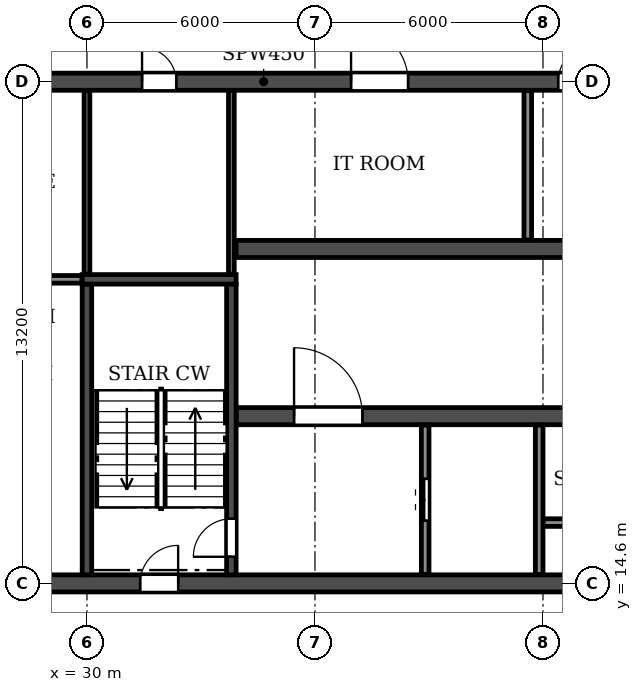
"""IFC4 building model, lengths in metres.
Left out: names, types, materials, properties, quantities, classifications, styles, units other than length and angle.
Written with IfcOpenShell. Run it as: python <this file> out.ifc"""

import sys

from ifc_helpers import new_model, si_unit, direction, frame, frame_2d, origin, place, context, subcontext, project, spatial, rectangle, extrude, element, fill, save


model = new_model("IFC4")
c1 = context("Model", 3, precision=1e-05, world=origin(), true_north=direction((0.0, 1.0)))
c2 = subcontext(c1, "Body", "Model", "MODEL_VIEW")
j1 = project(units=[si_unit("LENGTHUNIT", "METRE"), si_unit("PLANEANGLEUNIT", "RADIAN")], contexts=[c1])
p1 = place(None, origin())
s1 = spatial("IfcSite", under=j1, at=p1, CompositionType="ELEMENT")
p2 = place(p1, origin())
s2 = spatial("IfcBuilding", under=s1, at=p2, CompositionType="ELEMENT")
p3 = place(p2, frame((0.0, 0.0, 10.8)))
s3 = spatial("IfcBuildingStorey", under=s2, at=p3, CompositionType="ELEMENT", Elevation=10.8)
p4 = place(p3, frame((18.0, 14.6, 0.0), z_axis=(0.0, 0.0, 1.0), x_axis=(1.0, 0.0, 0.0)))
e1 = element("IfcWall", 1, at=p4, inside=s3, PredefinedType="SOLIDWALL", context=c2, shape_type="SweptSolid", body=[
    extrude(rectangle(XDim=66.0, YDim=0.45, at=frame_2d((33.0, 0.0))), origin(), (0.0, 0.0, 1.0), 3.92),
])
p5 = place(p4, frame((0.9, 0.0, 0.0)))
e2 = element("IfcOpeningElement", 2, at=p5, cuts=e1, PredefinedType="OPENING", context=c2, shape_type="SweptSolid", body=[
    extrude(rectangle(XDim=1.0, YDim=2.1, at=frame_2d((0.5, 1.05))), frame((0.0, 0.235, 0.0), z_axis=(0.0, -1.0, 0.0), x_axis=(1.0, 0.0, 0.0)), (0.0, 0.0, 1.0), 0.47),
])
p6 = place(p4, frame((8.8, 0.0, 0.0)))
e3 = element("IfcOpeningElement", 3, at=p6, cuts=e1, PredefinedType="OPENING", context=c2, shape_type="SweptSolid", body=[
    extrude(rectangle(XDim=1.0, YDim=2.1, at=frame_2d((0.5, 1.05))), frame((0.0, 0.235, 0.0), z_axis=(0.0, -1.0, 0.0), x_axis=(1.0, 0.0, 0.0)), (0.0, 0.0, 1.0), 0.47),
])
p7 = place(p4, frame((13.4, 0.0, 0.0)))
e4 = element("IfcOpeningElement", 4, at=p7, cuts=e1, PredefinedType="OPENING", context=c2, shape_type="SweptSolid", body=[
    extrude(rectangle(XDim=1.0, YDim=2.1, at=frame_2d((0.5, 1.05))), frame((0.0, 0.235, 0.0), z_axis=(0.0, -1.0, 0.0), x_axis=(1.0, 0.0, 0.0)), (0.0, 0.0, 1.0), 0.47),
])
p8 = place(p4, frame((24.7, 0.0, 0.0)))
e5 = element("IfcOpeningElement", 5, at=p8, cuts=e1, PredefinedType="OPENING", context=c2, shape_type="SweptSolid", body=[
    extrude(rectangle(XDim=1.0, YDim=2.1, at=frame_2d((0.5, 1.05))), frame((0.0, 0.235, 0.0), z_axis=(0.0, -1.0, 0.0), x_axis=(1.0, 0.0, 0.0)), (0.0, 0.0, 1.0), 0.47),
])
p9 = place(p4, frame((28.6, 0.0, 0.0)))
e6 = element("IfcOpeningElement", 6, at=p9, cuts=e1, PredefinedType="OPENING", context=c2, shape_type="SweptSolid", body=[
    extrude(rectangle(XDim=1.0, YDim=2.1, at=frame_2d((0.5, 1.05))), frame((0.0, 0.235, 0.0), z_axis=(0.0, -1.0, 0.0), x_axis=(1.0, 0.0, 0.0)), (0.0, 0.0, 1.0), 0.47),
])
p10 = place(p4, frame((32.5, 0.0, 0.0)))
e7 = element("IfcOpeningElement", 7, at=p10, cuts=e1, PredefinedType="OPENING", context=c2, shape_type="SweptSolid", body=[
    extrude(rectangle(XDim=1.0, YDim=2.1, at=frame_2d((0.5, 1.05))), frame((0.0, 0.235, 0.0), z_axis=(0.0, -1.0, 0.0), x_axis=(1.0, 0.0, 0.0)), (0.0, 0.0, 1.0), 0.47),
])
p11 = place(p4, frame((35.1, 0.0, 0.0)))
e8 = element("IfcOpeningElement", 8, at=p11, cuts=e1, PredefinedType="OPENING", context=c2, shape_type="SweptSolid", body=[
    extrude(rectangle(XDim=1.0, YDim=2.1, at=frame_2d((0.5, 1.05))), frame((0.0, 0.235, 0.0), z_axis=(0.0, -1.0, 0.0), x_axis=(1.0, 0.0, 0.0)), (0.0, 0.0, 1.0), 0.47),
])
p12 = place(p4, frame((39.0, 0.0, 0.0)))
e9 = element("IfcOpeningElement", 9, at=p12, cuts=e1, PredefinedType="OPENING", context=c2, shape_type="SweptSolid", body=[
    extrude(rectangle(XDim=1.0, YDim=2.1, at=frame_2d((0.5, 1.05))), frame((0.0, 0.235, 0.0), z_axis=(0.0, -1.0, 0.0), x_axis=(1.0, 0.0, 0.0)), (0.0, 0.0, 1.0), 0.47),
])
p13 = place(p4, frame((51.6, 0.0, 0.0)))
e10 = element("IfcOpeningElement", 10, at=p13, cuts=e1, PredefinedType="OPENING", context=c2, shape_type="SweptSolid", body=[
    extrude(rectangle(XDim=1.0, YDim=2.1, at=frame_2d((0.5, 1.05))), frame((0.0, 0.235, 0.0), z_axis=(0.0, -1.0, 0.0), x_axis=(1.0, 0.0, 0.0)), (0.0, 0.0, 1.0), 0.47),
])
p14 = place(p4, frame((56.25, 0.0, 0.0)))
e11 = element("IfcOpeningElement", 11, at=p14, cuts=e1, PredefinedType="OPENING", context=c2, shape_type="SweptSolid", body=[
    extrude(rectangle(XDim=0.9, YDim=2.1, at=frame_2d((0.45, 1.05))), frame((0.0, 0.235, 0.0), z_axis=(0.0, -1.0, 0.0), x_axis=(1.0, 0.0, 0.0)), (0.0, 0.0, 1.0), 0.47),
])
p15 = place(p4, frame((64.1, 0.0, 0.0)))
e12 = element("IfcOpeningElement", 12, at=p15, cuts=e1, PredefinedType="OPENING", context=c2, shape_type="SweptSolid", body=[
    extrude(rectangle(XDim=1.0, YDim=2.1, at=frame_2d((0.5, 1.05))), frame((0.0, 0.235, 0.0), z_axis=(0.0, -1.0, 0.0), x_axis=(1.0, 0.0, 0.0)), (0.0, 0.0, 1.0), 0.47),
])
p16 = place(p3, frame((18.0, 27.8, 0.0), z_axis=(0.0, 0.0, 1.0), x_axis=(1.0, 0.0, 0.0)))
e13 = element("IfcWall", 13, at=p16, inside=s3, PredefinedType="SOLIDWALL", context=c2, shape_type="SweptSolid", body=[
    extrude(rectangle(XDim=66.0, YDim=0.45, at=frame_2d((33.0, 0.0))), origin(), (0.0, 0.0, 1.0), 3.92),
])
p17 = place(p16, frame((0.9, 0.0, 0.0)))
e14 = element("IfcOpeningElement", 14, at=p17, cuts=e13, PredefinedType="OPENING", context=c2, shape_type="SweptSolid", body=[
    extrude(rectangle(XDim=1.0, YDim=2.1, at=frame_2d((0.5, 1.05))), frame((0.0, 0.235, 0.0), z_axis=(0.0, -1.0, 0.0), x_axis=(1.0, 0.0, 0.0)), (0.0, 0.0, 1.0), 0.47),
])
p18 = place(p16, frame((4.25, 0.0, 0.0)))
e15 = element("IfcOpeningElement", 15, at=p18, cuts=e13, PredefinedType="OPENING", context=c2, shape_type="SweptSolid", body=[
    extrude(rectangle(XDim=0.9, YDim=2.1, at=frame_2d((0.45, 1.05))), frame((0.0, 0.235, 0.0), z_axis=(0.0, -1.0, 0.0), x_axis=(1.0, 0.0, 0.0)), (0.0, 0.0, 1.0), 0.47),
])
p19 = place(p16, frame((8.85, 0.0, 0.0)))
e16 = element("IfcOpeningElement", 16, at=p19, cuts=e13, PredefinedType="OPENING", context=c2, shape_type="SweptSolid", body=[
    extrude(rectangle(XDim=0.9, YDim=2.1, at=frame_2d((0.45, 1.05))), frame((0.0, 0.235, 0.0), z_axis=(0.0, -1.0, 0.0), x_axis=(1.0, 0.0, 0.0)), (0.0, 0.0, 1.0), 0.47),
])
p20 = place(p16, frame((13.45, 0.0, 0.0)))
e17 = element("IfcOpeningElement", 17, at=p20, cuts=e13, PredefinedType="OPENING", context=c2, shape_type="SweptSolid", body=[
    extrude(rectangle(XDim=0.9, YDim=2.1, at=frame_2d((0.45, 1.05))), frame((0.0, 0.235, 0.0), z_axis=(0.0, -1.0, 0.0), x_axis=(1.0, 0.0, 0.0)), (0.0, 0.0, 1.0), 0.47),
])
p21 = place(p16, frame((18.95, 0.0, 0.0)))
e18 = element("IfcOpeningElement", 18, at=p21, cuts=e13, PredefinedType="OPENING", context=c2, shape_type="SweptSolid", body=[
    extrude(rectangle(XDim=1.5, YDim=2.1, at=frame_2d((0.75, 1.05))), frame((0.0, 0.235, 0.0), z_axis=(0.0, -1.0, 0.0), x_axis=(1.0, 0.0, 0.0)), (0.0, 0.0, 1.0), 0.47),
])
p22 = place(p16, frame((24.4, 0.0, 0.0)))
e19 = element("IfcOpeningElement", 19, at=p22, cuts=e13, PredefinedType="OPENING", context=c2, shape_type="SweptSolid", body=[
    extrude(rectangle(XDim=1.0, YDim=2.1, at=frame_2d((0.5, 1.05))), frame((0.0, 0.235, 0.0), z_axis=(0.0, -1.0, 0.0), x_axis=(1.0, 0.0, 0.0)), (0.0, 0.0, 1.0), 0.47),
])
p23 = place(p16, frame((29.6, 0.0, 0.0)))
e20 = element("IfcOpeningElement", 20, at=p23, cuts=e13, PredefinedType="OPENING", context=c2, shape_type="SweptSolid", body=[
    extrude(rectangle(XDim=1.0, YDim=2.1, at=frame_2d((0.5, 1.05))), frame((0.0, 0.235, 0.0), z_axis=(0.0, -1.0, 0.0), x_axis=(1.0, 0.0, 0.0)), (0.0, 0.0, 1.0), 0.47),
])
p24 = place(p16, frame((32.5, 0.0, 0.0)))
e21 = element("IfcOpeningElement", 21, at=p24, cuts=e13, PredefinedType="OPENING", context=c2, shape_type="SweptSolid", body=[
    extrude(rectangle(XDim=1.0, YDim=2.1, at=frame_2d((0.5, 1.05))), frame((0.0, 0.235, 0.0), z_axis=(0.0, -1.0, 0.0), x_axis=(1.0, 0.0, 0.0)), (0.0, 0.0, 1.0), 0.47),
])
p25 = place(p16, frame((38.0, 0.0, 0.0)))
e22 = element("IfcOpeningElement", 22, at=p25, cuts=e13, PredefinedType="OPENING", context=c2, shape_type="SweptSolid", body=[
    extrude(rectangle(XDim=1.0, YDim=2.1, at=frame_2d((0.5, 1.05))), frame((0.0, 0.235, 0.0), z_axis=(0.0, -1.0, 0.0), x_axis=(1.0, 0.0, 0.0)), (0.0, 0.0, 1.0), 0.47),
])
p26 = place(p16, frame((43.2, 0.0, 0.0)))
e23 = element("IfcOpeningElement", 23, at=p26, cuts=e13, PredefinedType="OPENING", context=c2, shape_type="SweptSolid", body=[
    extrude(rectangle(XDim=1.0, YDim=2.1, at=frame_2d((0.5, 1.05))), frame((0.0, 0.235, 0.0), z_axis=(0.0, -1.0, 0.0), x_axis=(1.0, 0.0, 0.0)), (0.0, 0.0, 1.0), 0.47),
])
p27 = place(p16, frame((47.1, 0.0, 0.0)))
e24 = element("IfcOpeningElement", 24, at=p27, cuts=e13, PredefinedType="OPENING", context=c2, shape_type="SweptSolid", body=[
    extrude(rectangle(XDim=1.0, YDim=2.1, at=frame_2d((0.5, 1.05))), frame((0.0, 0.235, 0.0), z_axis=(0.0, -1.0, 0.0), x_axis=(1.0, 0.0, 0.0)), (0.0, 0.0, 1.0), 0.47),
])
p28 = place(p16, frame((51.65, 0.0, 0.0)))
e25 = element("IfcOpeningElement", 25, at=p28, cuts=e13, PredefinedType="OPENING", context=c2, shape_type="SweptSolid", body=[
    extrude(rectangle(XDim=0.9, YDim=2.1, at=frame_2d((0.45, 1.05))), frame((0.0, 0.235, 0.0), z_axis=(0.0, -1.0, 0.0), x_axis=(1.0, 0.0, 0.0)), (0.0, 0.0, 1.0), 0.47),
])
p29 = place(p16, frame((56.2, 0.0, 0.0)))
e26 = element("IfcOpeningElement", 26, at=p29, cuts=e13, PredefinedType="OPENING", context=c2, shape_type="SweptSolid", body=[
    extrude(rectangle(XDim=1.0, YDim=2.1, at=frame_2d((0.5, 1.05))), frame((0.0, 0.235, 0.0), z_axis=(0.0, -1.0, 0.0), x_axis=(1.0, 0.0, 0.0)), (0.0, 0.0, 1.0), 0.47),
])
p30 = place(p16, frame((60.85, 0.0, 0.0)))
e27 = element("IfcOpeningElement", 27, at=p30, cuts=e13, PredefinedType="OPENING", context=c2, shape_type="SweptSolid", body=[
    extrude(rectangle(XDim=0.9, YDim=2.1, at=frame_2d((0.45, 1.05))), frame((0.0, 0.235, 0.0), z_axis=(0.0, -1.0, 0.0), x_axis=(1.0, 0.0, 0.0)), (0.0, 0.0, 1.0), 0.47),
])
p31 = place(p16, frame((64.1, 0.0, 0.0)))
e28 = element("IfcOpeningElement", 28, at=p31, cuts=e13, PredefinedType="OPENING", context=c2, shape_type="SweptSolid", body=[
    extrude(rectangle(XDim=1.0, YDim=2.1, at=frame_2d((0.5, 1.05))), frame((0.0, 0.235, 0.0), z_axis=(0.0, -1.0, 0.0), x_axis=(1.0, 0.0, 0.0)), (0.0, 0.0, 1.0), 0.47),
])
p32 = place(p3, frame((33.925, 19.0, 0.0), z_axis=(0.0, 0.0, 1.0), x_axis=(1.0, 0.0, 0.0)))
e29 = element("IfcWall", 29, at=p32, inside=s3, PredefinedType="SOLIDWALL", context=c2, shape_type="SweptSolid", body=[
    extrude(rectangle(XDim=34.15, YDim=0.45, at=frame_2d((17.075, 0.0))), origin(), (0.0, 0.0, 1.0), 3.92),
])
p33 = place(p32, frame((16.175, 0.0, 0.0)))
e30 = element("IfcOpeningElement", 30, at=p33, cuts=e29, PredefinedType="OPENING", context=c2, shape_type="SweptSolid", body=[
    extrude(rectangle(XDim=1.8, YDim=2.1, at=frame_2d((0.9, 1.05))), frame((0.0, 0.235, 0.0), z_axis=(0.0, -1.0, 0.0), x_axis=(1.0, 0.0, 0.0)), (0.0, 0.0, 1.0), 0.47),
])
p34 = place(p32, frame((1.525, 0.0, 0.0)))
e31 = element("IfcOpeningElement", 31, at=p34, cuts=e29, PredefinedType="OPENING", context=c2, shape_type="SweptSolid", body=[
    extrude(rectangle(XDim=1.8, YDim=2.1, at=frame_2d((0.9, 1.05))), frame((0.0, 0.235, 0.0), z_axis=(0.0, -1.0, 0.0), x_axis=(1.0, 0.0, 0.0)), (0.0, 0.0, 1.0), 0.47),
])
p35 = place(p32, frame((8.725, 0.0, 0.0)))
e32 = element("IfcOpeningElement", 32, at=p35, cuts=e29, PredefinedType="OPENING", context=c2, shape_type="SweptSolid", body=[
    extrude(rectangle(XDim=1.1, YDim=2.1, at=frame_2d((0.55, 1.05))), frame((0.0, 0.235, 0.0), z_axis=(0.0, -1.0, 0.0), x_axis=(1.0, 0.0, 0.0)), (0.0, 0.0, 1.0), 0.47),
])
p36 = place(p32, frame((11.325, 0.0, 0.0)))
e33 = element("IfcOpeningElement", 33, at=p36, cuts=e29, PredefinedType="OPENING", context=c2, shape_type="SweptSolid", body=[
    extrude(rectangle(XDim=1.1, YDim=2.1, at=frame_2d((0.55, 1.05))), frame((0.0, 0.235, 0.0), z_axis=(0.0, -1.0, 0.0), x_axis=(1.0, 0.0, 0.0)), (0.0, 0.0, 1.0), 0.47),
])
p37 = place(p32, frame((13.925, 0.0, 0.0)))
e34 = element("IfcOpeningElement", 34, at=p37, cuts=e29, PredefinedType="OPENING", context=c2, shape_type="SweptSolid", body=[
    extrude(rectangle(XDim=1.1, YDim=2.1, at=frame_2d((0.55, 1.05))), frame((0.0, 0.235, 0.0), z_axis=(0.0, -1.0, 0.0), x_axis=(1.0, 0.0, 0.0)), (0.0, 0.0, 1.0), 0.47),
])
p38 = place(p32, frame((19.125, 0.0, 0.0)))
e35 = element("IfcOpeningElement", 35, at=p38, cuts=e29, PredefinedType="OPENING", context=c2, shape_type="SweptSolid", body=[
    extrude(rectangle(XDim=1.1, YDim=2.1, at=frame_2d((0.55, 1.05))), frame((0.0, 0.235, 0.0), z_axis=(0.0, -1.0, 0.0), x_axis=(1.0, 0.0, 0.0)), (0.0, 0.0, 1.0), 0.47),
])
p39 = place(p32, frame((21.725, 0.0, 0.0)))
e36 = element("IfcOpeningElement", 36, at=p39, cuts=e29, PredefinedType="OPENING", context=c2, shape_type="SweptSolid", body=[
    extrude(rectangle(XDim=1.1, YDim=2.1, at=frame_2d((0.55, 1.05))), frame((0.0, 0.235, 0.0), z_axis=(0.0, -1.0, 0.0), x_axis=(1.0, 0.0, 0.0)), (0.0, 0.0, 1.0), 0.47),
])
p40 = place(p32, frame((24.325, 0.0, 0.0)))
e37 = element("IfcOpeningElement", 37, at=p40, cuts=e29, PredefinedType="OPENING", context=c2, shape_type="SweptSolid", body=[
    extrude(rectangle(XDim=1.1, YDim=2.1, at=frame_2d((0.55, 1.05))), frame((0.0, 0.235, 0.0), z_axis=(0.0, -1.0, 0.0), x_axis=(1.0, 0.0, 0.0)), (0.0, 0.0, 1.0), 0.47),
])
p41 = place(p32, frame((30.825, 0.0, 0.0)))
e38 = element("IfcOpeningElement", 38, at=p41, cuts=e29, PredefinedType="OPENING", context=c2, shape_type="SweptSolid", body=[
    extrude(rectangle(XDim=1.8, YDim=2.1, at=frame_2d((0.9, 1.05))), frame((0.0, 0.235, 0.0), z_axis=(0.0, -1.0, 0.0), x_axis=(1.0, 0.0, 0.0)), (0.0, 0.0, 1.0), 0.47),
])
p42 = place(p3, frame((33.925, 23.4, 0.0), z_axis=(0.0, 0.0, 1.0), x_axis=(1.0, 0.0, 0.0)))
e39 = element("IfcWall", 39, at=p42, inside=s3, PredefinedType="SOLIDWALL", context=c2, shape_type="SweptSolid", body=[
    extrude(rectangle(XDim=34.15, YDim=0.45, at=frame_2d((17.075, 0.0))), origin(), (0.0, 0.0, 1.0), 3.92),
])
p43 = place(p42, frame((16.175, 0.0, 0.0)))
e40 = element("IfcOpeningElement", 40, at=p43, cuts=e39, PredefinedType="OPENING", context=c2, shape_type="SweptSolid", body=[
    extrude(rectangle(XDim=1.8, YDim=2.1, at=frame_2d((0.9, 1.05))), frame((0.0, 0.235, 0.0), z_axis=(0.0, -1.0, 0.0), x_axis=(1.0, 0.0, 0.0)), (0.0, 0.0, 1.0), 0.47),
])
p44 = place(p42, frame((11.025, 0.0, 0.0)))
e41 = element("IfcOpeningElement", 41, at=p44, cuts=e39, PredefinedType="OPENING", context=c2, shape_type="SweptSolid", body=[
    extrude(rectangle(XDim=1.1, YDim=2.1, at=frame_2d((0.55, 1.05))), frame((0.0, 0.235, 0.0), z_axis=(0.0, -1.0, 0.0), x_axis=(1.0, 0.0, 0.0)), (0.0, 0.0, 1.0), 0.47),
])
p45 = place(p42, frame((29.825, 0.0, 0.0)))
e42 = element("IfcOpeningElement", 42, at=p45, cuts=e39, PredefinedType="OPENING", context=c2, shape_type="SweptSolid", body=[
    extrude(rectangle(XDim=1.1, YDim=2.1, at=frame_2d((0.55, 1.05))), frame((0.0, 0.235, 0.0), z_axis=(0.0, -1.0, 0.0), x_axis=(1.0, 0.0, 0.0)), (0.0, 0.0, 1.0), 0.47),
])
p46 = place(p42, frame((32.425, 0.0, 0.0)))
e43 = element("IfcOpeningElement", 43, at=p46, cuts=e39, PredefinedType="OPENING", context=c2, shape_type="SweptSolid", body=[
    extrude(rectangle(XDim=1.1, YDim=2.1, at=frame_2d((0.55, 1.05))), frame((0.0, 0.235, 0.0), z_axis=(0.0, -1.0, 0.0), x_axis=(1.0, 0.0, 0.0)), (0.0, 0.0, 1.0), 0.47),
])
p47 = place(p3, frame((30.0, 14.825, 0.0), z_axis=(0.0, 0.0, 1.0), x_axis=(0.0, 1.0, 0.0)))
e44 = element("IfcWall", 44, at=p47, inside=s3, PredefinedType="SOLIDWALL", context=c2, shape_type="SweptSolid", body=[
    extrude(rectangle(XDim=7.65, YDim=0.25, at=frame_2d((3.825, 0.0))), origin(), (0.0, 0.0, 1.0), 3.92),
])
p48 = place(p3, frame((33.8, 14.825, 0.0), z_axis=(0.0, 0.0, 1.0), x_axis=(0.0, 1.0, 0.0)))
e45 = element("IfcWall", 45, at=p48, inside=s3, PredefinedType="SOLIDWALL", context=c2, shape_type="SweptSolid", body=[
    extrude(rectangle(XDim=7.65, YDim=0.25, at=frame_2d((3.825, 0.0))), origin(), (0.0, 0.0, 1.0), 3.92),
])
p49 = place(p48, frame((0.475, 0.0, 0.0)))
e46 = element("IfcOpeningElement", 46, at=p49, cuts=e45, PredefinedType="OPENING", context=c2, shape_type="SweptSolid", body=[
    extrude(rectangle(XDim=1.0, YDim=2.1, at=frame_2d((0.5, 1.05))), frame((0.0, 0.135, 0.0), z_axis=(0.0, -1.0, 0.0), x_axis=(1.0, 0.0, 0.0)), (0.0, 0.0, 1.0), 0.27),
])
p50 = place(p3, frame((29.875, 22.6, 0.0), z_axis=(0.0, 0.0, 1.0), x_axis=(1.0, 0.0, 0.0)))
e47 = element("IfcWall", 47, at=p50, inside=s3, PredefinedType="SOLIDWALL", context=c2, shape_type="SweptSolid", body=[
    extrude(rectangle(XDim=4.05, YDim=0.25, at=frame_2d((2.025, 0.0))), origin(), (0.0, 0.0, 1.0), 3.92),
])
p51 = place(p3, frame((41.6, 23.635, 0.0), z_axis=(0.0, 0.0, 1.0), x_axis=(0.0, 1.0, 0.0)))
e48 = element("IfcWall", 48, at=p51, inside=s3, PredefinedType="PARTITIONING", context=c2, shape_type="SweptSolid", body=[
    extrude(rectangle(XDim=3.93, YDim=0.2, at=frame_2d((1.965, 0.0))), origin(), (0.0, 0.0, 1.0), 3.92),
])
p52 = place(p3, frame((24.735, 22.6, 0.0), z_axis=(0.0, 0.0, 1.0), x_axis=(1.0, 0.0, 0.0)))
e49 = element("IfcWall", 49, at=p52, inside=s3, PredefinedType="PARTITIONING", context=c2, shape_type="SweptSolid", body=[
    extrude(rectangle(XDim=5.13, YDim=0.2, at=frame_2d((2.565, 0.0))), origin(), (0.0, 0.0, 1.0), 3.92),
])
for number, where, z_axis, x_axis in (
    (50, (30.0, 22.735, 0.0), (0.0, 0.0, 1.0), (0.0, 1.0, 0.0)),
    (51, (33.8, 22.735, 0.0), (0.0, 0.0, 1.0), (0.0, 1.0, 0.0)),
):
    element("IfcWall", number, at=place(p3, frame(where, z_axis=z_axis, x_axis=x_axis)), inside=s3, PredefinedType="PARTITIONING", context=c2, shape_type="SweptSolid", body=[
        extrude(rectangle(XDim=4.83, YDim=0.15, at=frame_2d((2.415, 0.0))), origin(), (0.0, 0.0, 1.0), 3.92),
    ])
p53 = place(p3, frame((42.0, 16.2, 0.0), z_axis=(0.0, 0.0, 1.0), x_axis=(1.0, 0.0, 0.0)))
e52 = element("IfcWall", 52, at=p53, inside=s3, PredefinedType="PARTITIONING", context=c2, shape_type="SweptSolid", body=[
    extrude(rectangle(XDim=7.8, YDim=0.2, at=frame_2d((3.9, 0.0))), origin(), (0.0, 0.0, 1.0), 3.92),
])
p54 = place(p3, frame((38.9, 14.835, 0.0), z_axis=(0.0, 0.0, 1.0), x_axis=(0.0, 1.0, 0.0)))
e53 = element("IfcWall", 53, at=p54, inside=s3, PredefinedType="PARTITIONING", context=c2, shape_type="SweptSolid", body=[
    extrude(rectangle(XDim=3.93, YDim=0.2, at=frame_2d((1.965, 0.0))), origin(), (0.0, 0.0, 1.0), 3.92),
])
p55 = place(p54, frame((1.415, 0.0, 0.0)))
e54 = element("IfcOpeningElement", 54, at=p55, cuts=e53, PredefinedType="OPENING", context=c2, shape_type="SweptSolid", body=[
    extrude(rectangle(XDim=1.1, YDim=2.1, at=frame_2d((0.55, 1.05))), frame((0.0, 0.11, 0.0), z_axis=(0.0, -1.0, 0.0), x_axis=(1.0, 0.0, 0.0)), (0.0, 0.0, 1.0), 0.22),
])
p56 = place(p3, frame((41.9, 14.835, 0.0), z_axis=(0.0, 0.0, 1.0), x_axis=(0.0, 1.0, 0.0)))
e55 = element("IfcWall", 55, at=p56, inside=s3, PredefinedType="PARTITIONING", context=c2, shape_type="SweptSolid", body=[
    extrude(rectangle(XDim=3.93, YDim=0.2, at=frame_2d((1.965, 0.0))), origin(), (0.0, 0.0, 1.0), 3.92),
])
p57 = place(p20, origin())
e56 = element("IfcDoor", 56, at=p57, inside=s3, OperationType="SINGLE_SWING_LEFT", PredefinedType="DOOR", context=c2, shape_type="SweptSolid", body=[
    extrude(rectangle(XDim=0.9, YDim=2.1, at=frame_2d((0.45, 1.05))), frame((0.0, 0.025, 0.0), z_axis=(0.0, -1.0, 0.0), x_axis=(1.0, 0.0, 0.0)), (0.0, 0.0, 1.0), 0.05),
])
fill(e17, e56)
p58 = place(p21, origin())
e57 = element("IfcDoor", 57, at=p58, inside=s3, OperationType="DOUBLE_DOOR_SINGLE_SWING", PredefinedType="DOOR", context=c2, shape_type="SweptSolid", body=[
    extrude(rectangle(XDim=1.5, YDim=2.1, at=frame_2d((0.75, 1.05))), frame((0.0, 0.025, 0.0), z_axis=(0.0, -1.0, 0.0), x_axis=(1.0, 0.0, 0.0)), (0.0, 0.0, 1.0), 0.05),
])
fill(e18, e57)
p59 = place(p22, origin())
e58 = element("IfcDoor", 58, at=p59, inside=s3, OperationType="SINGLE_SWING_RIGHT", PredefinedType="DOOR", context=c2, shape_type="SweptSolid", body=[
    extrude(rectangle(XDim=1.0, YDim=2.1, at=frame_2d((0.5, 1.05))), frame((0.0, 0.025, 0.0), z_axis=(0.0, -1.0, 0.0), x_axis=(1.0, 0.0, 0.0)), (0.0, 0.0, 1.0), 0.05),
])
fill(e19, e58)
p60 = place(p7, origin())
e59 = element("IfcDoor", 59, at=p60, inside=s3, OperationType="SINGLE_SWING_RIGHT", PredefinedType="DOOR", context=c2, shape_type="SweptSolid", body=[
    extrude(rectangle(XDim=1.0, YDim=2.1, at=frame_2d((0.5, 1.05))), frame((0.0, 0.025, 0.0), z_axis=(0.0, -1.0, 0.0), x_axis=(1.0, 0.0, 0.0)), (0.0, 0.0, 1.0), 0.05),
])
fill(e4, e59)
p61 = place(p49, origin())
e60 = element("IfcDoor", 60, at=p61, inside=s3, OperationType="SINGLE_SWING_LEFT", PredefinedType="DOOR", context=c2, shape_type="SweptSolid", body=[
    extrude(rectangle(XDim=1.0, YDim=2.1, at=frame_2d((0.5, 1.05))), frame((0.0, 0.025, 0.0), z_axis=(0.0, -1.0, 0.0), x_axis=(1.0, 0.0, 0.0)), (0.0, 0.0, 1.0), 0.05),
])
fill(e46, e60)
p62 = place(p55, origin())
e61 = element("IfcDoor", 61, at=p62, inside=s3, OperationType="DOUBLE_DOOR_SLIDING", PredefinedType="DOOR", context=c2, shape_type="SweptSolid", body=[
    extrude(rectangle(XDim=1.1, YDim=2.1, at=frame_2d((0.55, 1.05))), frame((0.0, 0.025, 0.0), z_axis=(0.0, -1.0, 0.0), x_axis=(1.0, 0.0, 0.0)), (0.0, 0.0, 1.0), 0.05),
])
fill(e54, e61)
p63 = place(p34, origin())
e62 = element("IfcDoor", 62, at=p63, inside=s3, OperationType="DOUBLE_DOOR_SINGLE_SWING", PredefinedType="DOOR", context=c2, shape_type="SweptSolid", body=[
    extrude(rectangle(XDim=1.8, YDim=2.1, at=frame_2d((0.9, 1.05))), frame((0.0, 0.025, 0.0), z_axis=(0.0, -1.0, 0.0), x_axis=(1.0, 0.0, 0.0)), (0.0, 0.0, 1.0), 0.05),
])
fill(e31, e62)
save(model, sys.argv[1])
